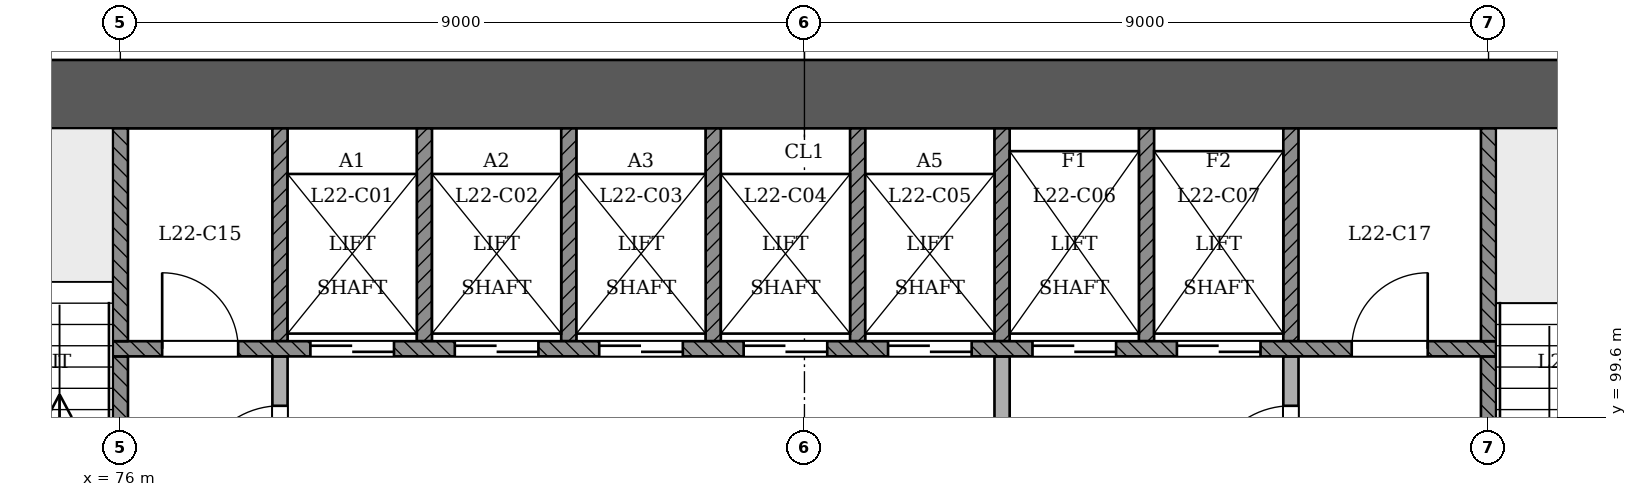
"""IFC4 building model, lengths in metres.
Left out: names, types, materials, properties, quantities, classifications, styles, units other than length and angle.
Written with IfcOpenShell. Run it as: python <this file> out.ifc"""

import sys

from ifc_helpers import new_model, si_unit, direction, frame, frame_2d, origin, place, context, subcontext, project, spatial, rectangle, extrude, element, fill, save


model = new_model("IFC4")
c1 = context("Model", 3, precision=1e-05, world=origin(), true_north=direction((0.0, 1.0)))
c2 = subcontext(c1, "Body", "Model", "MODEL_VIEW")
j1 = project(units=[si_unit("LENGTHUNIT", "METRE"), si_unit("PLANEANGLEUNIT", "RADIAN")], contexts=[c1])
p1 = place(None, origin())
s1 = spatial("IfcSite", under=j1, at=p1, CompositionType="ELEMENT")
p2 = place(p1, origin())
s2 = spatial("IfcBuilding", under=s1, at=p2, CompositionType="ELEMENT")
p3 = place(p2, frame((0.0, 0.0, 88.2)))
s3 = spatial("IfcBuildingStorey", under=s2, at=p3, CompositionType="ELEMENT", Elevation=88.2)
p4 = place(p3, frame((97.45, 103.85, 0.0), z_axis=(0.0, 0.0, 1.0), x_axis=(-1.0, 0.0, 0.0)))
e1 = element("IfcWall", 1, at=p4, inside=s3, PredefinedType="SHEAR", context=c2, shape_type="SweptSolid", body=[
    extrude(rectangle(XDim=25.35, YDim=0.9, at=frame_2d((12.675, 0.0))), origin(), (0.0, 0.0, 1.0), 3.6),
])
p5 = place(p3, frame((87.6, 93.4, 0.0), z_axis=(0.0, 0.0, 1.0), x_axis=(0.0, 1.0, 0.0)))
e2 = element("IfcWall", 2, at=p5, inside=s3, PredefinedType="PARTITIONING", context=c2, shape_type="SweptSolid", body=[
    extrude(rectangle(XDim=7.0, YDim=0.2, at=frame_2d((3.5, 0.0))), origin(), (0.0, 0.0, 1.0), 3.1),
])
p6 = place(p5, frame((4.45, 0.0, 0.0)))
e3 = element("IfcOpeningElement", 3, at=p6, cuts=e2, PredefinedType="OPENING", context=c2, shape_type="SweptSolid", body=[
    extrude(rectangle(XDim=1.1, YDim=2.1, at=frame_2d((0.55, 1.05))), frame((0.0, 0.11, 0.0), z_axis=(0.0, -1.0, 0.0), x_axis=(1.0, 0.0, 0.0)), (0.0, 0.0, 1.0), 0.221),
])
p7 = place(p3, frame((91.4, 96.2, 0.0), z_axis=(0.0, 0.0, 1.0), x_axis=(0.0, 1.0, 0.0)))
e4 = element("IfcWall", 4, at=p7, inside=s3, PredefinedType="PARTITIONING", context=c2, shape_type="SweptSolid", body=[
    extrude(rectangle(XDim=4.2, YDim=0.2, at=frame_2d((2.1, 0.0))), origin(), (0.0, 0.0, 1.0), 3.1),
])
p8 = place(p7, frame((2.45, 0.0, 0.0)))
e5 = element("IfcOpeningElement", 5, at=p8, cuts=e4, PredefinedType="OPENING", context=c2, shape_type="SweptSolid", body=[
    extrude(rectangle(XDim=1.1, YDim=2.1, at=frame_2d((0.55, 1.05))), frame((0.0, 0.11, 0.0), z_axis=(0.0, -1.0, 0.0), x_axis=(1.0, 0.0, 0.0)), (0.0, 0.0, 1.0), 0.221),
])
p9 = place(p3, frame((76.0, 96.7, 0.0), z_axis=(0.0, 0.0, 1.0), x_axis=(0.0, 1.0, 0.0)))
e6 = element("IfcWall", 6, at=p9, inside=s3, PredefinedType="SOLIDWALL", context=c2, shape_type="SweptSolid", body=[
    extrude(rectangle(XDim=3.7, YDim=0.2, at=frame_2d((1.85, 0.0))), origin(), (0.0, 0.0, 1.0), 3.1),
])
p10 = place(p9, frame((0.35, 0.0, 0.0)))
e7 = element("IfcOpeningElement", 7, at=p10, cuts=e6, PredefinedType="OPENING", context=c2, shape_type="SweptSolid", body=[
    extrude(rectangle(XDim=1.1, YDim=2.1, at=frame_2d((0.55, 1.05))), frame((0.0, 0.11, 0.0), z_axis=(0.0, -1.0, 0.0), x_axis=(1.0, 0.0, 0.0)), (0.0, 0.0, 1.0), 0.221),
])
p11 = place(p3, frame((78.1, 96.7, 0.0), z_axis=(0.0, 0.0, 1.0), x_axis=(0.0, 1.0, 0.0)))
e8 = element("IfcWall", 8, at=p11, inside=s3, PredefinedType="PARTITIONING", context=c2, shape_type="SweptSolid", body=[
    extrude(rectangle(XDim=3.7, YDim=0.2, at=frame_2d((1.85, 0.0))), origin(), (0.0, 0.0, 1.0), 3.1),
])
p12 = place(p11, frame((1.95, 0.0, 0.0)))
e9 = element("IfcOpeningElement", 9, at=p12, cuts=e8, PredefinedType="OPENING", context=c2, shape_type="SweptSolid", body=[
    extrude(rectangle(XDim=1.1, YDim=2.1, at=frame_2d((0.55, 1.05))), frame((0.0, 0.11, 0.0), z_axis=(0.0, -1.0, 0.0), x_axis=(1.0, 0.0, 0.0)), (0.0, 0.0, 1.0), 0.221),
])
p13 = place(p3, frame((94.0, 96.7, 0.0), z_axis=(0.0, 0.0, 1.0), x_axis=(0.0, 1.0, 0.0)))
e10 = element("IfcWall", 10, at=p13, inside=s3, PredefinedType="SOLIDWALL", context=c2, shape_type="SweptSolid", body=[
    extrude(rectangle(XDim=3.7, YDim=0.2, at=frame_2d((1.85, 0.0))), origin(), (0.0, 0.0, 1.0), 3.1),
])
p14 = place(p13, frame((0.35, 0.0, 0.0)))
e11 = element("IfcOpeningElement", 11, at=p14, cuts=e10, PredefinedType="OPENING", context=c2, shape_type="SweptSolid", body=[
    extrude(rectangle(XDim=1.1, YDim=2.1, at=frame_2d((0.55, 1.05))), frame((0.0, 0.11, 0.0), z_axis=(0.0, -1.0, 0.0), x_axis=(1.0, 0.0, 0.0)), (0.0, 0.0, 1.0), 0.221),
])
p15 = place(p3, frame((75.9, 100.5, 0.0), z_axis=(0.0, 0.0, 1.0), x_axis=(1.0, 0.0, 0.0)))
e12 = element("IfcWall", 12, at=p15, inside=s3, PredefinedType="SOLIDWALL", context=c2, shape_type="SweptSolid", body=[
    extrude(rectangle(XDim=18.2, YDim=0.2, at=frame_2d((9.1, 0.0))), origin(), (0.0, 0.0, 1.0), 3.1),
])
p16 = place(p15, frame((2.6, 0.0, 0.0)))
e13 = element("IfcOpeningElement", 13, at=p16, cuts=e12, PredefinedType="OPENING", context=c2, shape_type="SweptSolid", body=[
    extrude(rectangle(XDim=1.1, YDim=2.1, at=frame_2d((0.55, 1.05))), frame((0.0, 0.11, 0.0), z_axis=(0.0, -1.0, 0.0), x_axis=(1.0, 0.0, 0.0)), (0.0, 0.0, 1.0), 0.221),
])
p17 = place(p15, frame((4.5, 0.0, 0.0)))
e14 = element("IfcOpeningElement", 14, at=p17, cuts=e12, PredefinedType="OPENING", context=c2, shape_type="SweptSolid", body=[
    extrude(rectangle(XDim=1.1, YDim=2.1, at=frame_2d((0.55, 1.05))), frame((0.0, 0.11, 0.0), z_axis=(0.0, -1.0, 0.0), x_axis=(1.0, 0.0, 0.0)), (0.0, 0.0, 1.0), 0.221),
])
p18 = place(p15, frame((6.4, 0.0, 0.0)))
e15 = element("IfcOpeningElement", 15, at=p18, cuts=e12, PredefinedType="OPENING", context=c2, shape_type="SweptSolid", body=[
    extrude(rectangle(XDim=1.1, YDim=2.1, at=frame_2d((0.55, 1.05))), frame((0.0, 0.11, 0.0), z_axis=(0.0, -1.0, 0.0), x_axis=(1.0, 0.0, 0.0)), (0.0, 0.0, 1.0), 0.221),
])
p19 = place(p15, frame((8.3, 0.0, 0.0)))
e16 = element("IfcOpeningElement", 16, at=p19, cuts=e12, PredefinedType="OPENING", context=c2, shape_type="SweptSolid", body=[
    extrude(rectangle(XDim=1.1, YDim=2.1, at=frame_2d((0.55, 1.05))), frame((0.0, 0.11, 0.0), z_axis=(0.0, -1.0, 0.0), x_axis=(1.0, 0.0, 0.0)), (0.0, 0.0, 1.0), 0.221),
])
p20 = place(p15, frame((10.2, 0.0, 0.0)))
e17 = element("IfcOpeningElement", 17, at=p20, cuts=e12, PredefinedType="OPENING", context=c2, shape_type="SweptSolid", body=[
    extrude(rectangle(XDim=1.1, YDim=2.1, at=frame_2d((0.55, 1.05))), frame((0.0, 0.11, 0.0), z_axis=(0.0, -1.0, 0.0), x_axis=(1.0, 0.0, 0.0)), (0.0, 0.0, 1.0), 0.221),
])
p21 = place(p15, frame((12.1, 0.0, 0.0)))
e18 = element("IfcOpeningElement", 18, at=p21, cuts=e12, PredefinedType="OPENING", context=c2, shape_type="SweptSolid", body=[
    extrude(rectangle(XDim=1.1, YDim=2.1, at=frame_2d((0.55, 1.05))), frame((0.0, 0.11, 0.0), z_axis=(0.0, -1.0, 0.0), x_axis=(1.0, 0.0, 0.0)), (0.0, 0.0, 1.0), 0.221),
])
p22 = place(p15, frame((14.0, 0.0, 0.0)))
e19 = element("IfcOpeningElement", 19, at=p22, cuts=e12, PredefinedType="OPENING", context=c2, shape_type="SweptSolid", body=[
    extrude(rectangle(XDim=1.1, YDim=2.1, at=frame_2d((0.55, 1.05))), frame((0.0, 0.11, 0.0), z_axis=(0.0, -1.0, 0.0), x_axis=(1.0, 0.0, 0.0)), (0.0, 0.0, 1.0), 0.221),
])
p23 = place(p15, frame((0.65, 0.0, 0.0)))
e20 = element("IfcOpeningElement", 20, at=p23, cuts=e12, PredefinedType="OPENING", context=c2, shape_type="SweptSolid", body=[
    extrude(rectangle(XDim=1.0, YDim=2.1, at=frame_2d((0.5, 1.05))), frame((0.0, 0.11, 0.0), z_axis=(0.0, -1.0, 0.0), x_axis=(1.0, 0.0, 0.0)), (0.0, 0.0, 1.0), 0.221),
])
p24 = place(p15, frame((16.3, 0.0, 0.0)))
e21 = element("IfcOpeningElement", 21, at=p24, cuts=e12, PredefinedType="OPENING", context=c2, shape_type="SweptSolid", body=[
    extrude(rectangle(XDim=1.0, YDim=2.1, at=frame_2d((0.5, 1.05))), frame((0.0, 0.11, 0.0), z_axis=(0.0, -1.0, 0.0), x_axis=(1.0, 0.0, 0.0)), (0.0, 0.0, 1.0), 0.221),
])
for number, where, z_axis, x_axis in (
    (22, (76.0, 100.6, 0.0), (0.0, 0.0, 1.0), (0.0, 1.0, 0.0)),
    (23, (78.1, 100.6, 0.0), (0.0, 0.0, 1.0), (0.0, 1.0, 0.0)),
    (24, (80.0, 100.6, 0.0), (0.0, 0.0, 1.0), (0.0, 1.0, 0.0)),
    (25, (81.9, 100.6, 0.0), (0.0, 0.0, 1.0), (0.0, 1.0, 0.0)),
    (26, (83.8, 100.6, 0.0), (0.0, 0.0, 1.0), (0.0, 1.0, 0.0)),
    (27, (85.7, 100.6, 0.0), (0.0, 0.0, 1.0), (0.0, 1.0, 0.0)),
    (28, (87.6, 100.6, 0.0), (0.0, 0.0, 1.0), (0.0, 1.0, 0.0)),
    (29, (89.5, 100.6, 0.0), (0.0, 0.0, 1.0), (0.0, 1.0, 0.0)),
    (30, (91.4, 100.6, 0.0), (0.0, 0.0, 1.0), (0.0, 1.0, 0.0)),
    (31, (94.0, 100.6, 0.0), (0.0, 0.0, 1.0), (0.0, 1.0, 0.0)),
):
    element("IfcWall", number, at=place(p3, frame(where, z_axis=z_axis, x_axis=x_axis)), inside=s3, PredefinedType="SOLIDWALL", context=c2, shape_type="SweptSolid", body=[
        extrude(rectangle(XDim=2.8, YDim=0.2, at=frame_2d((1.4, 0.0))), origin(), (0.0, 0.0, 1.0), 3.1),
    ])
p25 = place(p16, origin())
e32 = element("IfcDoor", 32, at=p25, inside=s3, OperationType="SLIDING_TO_RIGHT", PredefinedType="NOTDEFINED", context=c2, shape_type="SweptSolid", body=[
    extrude(rectangle(XDim=1.1, YDim=2.1, at=frame_2d((0.55, 1.05))), frame((0.0, 0.025, 0.0), z_axis=(0.0, -1.0, 0.0), x_axis=(1.0, 0.0, 0.0)), (0.0, 0.0, 1.0), 0.05),
])
fill(e13, e32)
p26 = place(p17, origin())
e33 = element("IfcDoor", 33, at=p26, inside=s3, OperationType="SLIDING_TO_LEFT", PredefinedType="NOTDEFINED", context=c2, shape_type="SweptSolid", body=[
    extrude(rectangle(XDim=1.1, YDim=2.1, at=frame_2d((0.55, 1.05))), frame((0.0, 0.025, 0.0), z_axis=(0.0, -1.0, 0.0), x_axis=(1.0, 0.0, 0.0)), (0.0, 0.0, 1.0), 0.05),
])
fill(e14, e33)
p27 = place(p18, origin())
e34 = element("IfcDoor", 34, at=p27, inside=s3, OperationType="SLIDING_TO_RIGHT", PredefinedType="NOTDEFINED", context=c2, shape_type="SweptSolid", body=[
    extrude(rectangle(XDim=1.1, YDim=2.1, at=frame_2d((0.55, 1.05))), frame((0.0, 0.025, 0.0), z_axis=(0.0, -1.0, 0.0), x_axis=(1.0, 0.0, 0.0)), (0.0, 0.0, 1.0), 0.05),
])
fill(e15, e34)
p28 = place(p19, origin())
e35 = element("IfcDoor", 35, at=p28, inside=s3, OperationType="SLIDING_TO_LEFT", PredefinedType="NOTDEFINED", context=c2, shape_type="SweptSolid", body=[
    extrude(rectangle(XDim=1.1, YDim=2.1, at=frame_2d((0.55, 1.05))), frame((0.0, 0.025, 0.0), z_axis=(0.0, -1.0, 0.0), x_axis=(1.0, 0.0, 0.0)), (0.0, 0.0, 1.0), 0.05),
])
fill(e16, e35)
p29 = place(p20, origin())
e36 = element("IfcDoor", 36, at=p29, inside=s3, OperationType="SLIDING_TO_RIGHT", PredefinedType="NOTDEFINED", context=c2, shape_type="SweptSolid", body=[
    extrude(rectangle(XDim=1.1, YDim=2.1, at=frame_2d((0.55, 1.05))), frame((0.0, 0.025, 0.0), z_axis=(0.0, -1.0, 0.0), x_axis=(1.0, 0.0, 0.0)), (0.0, 0.0, 1.0), 0.05),
])
fill(e17, e36)
p30 = place(p21, origin())
e37 = element("IfcDoor", 37, at=p30, inside=s3, OperationType="SLIDING_TO_RIGHT", PredefinedType="NOTDEFINED", context=c2, shape_type="SweptSolid", body=[
    extrude(rectangle(XDim=1.1, YDim=2.1, at=frame_2d((0.55, 1.05))), frame((0.0, 0.025, 0.0), z_axis=(0.0, -1.0, 0.0), x_axis=(1.0, 0.0, 0.0)), (0.0, 0.0, 1.0), 0.05),
])
fill(e18, e37)
p31 = place(p22, origin())
e38 = element("IfcDoor", 38, at=p31, inside=s3, OperationType="SLIDING_TO_LEFT", PredefinedType="NOTDEFINED", context=c2, shape_type="SweptSolid", body=[
    extrude(rectangle(XDim=1.1, YDim=2.1, at=frame_2d((0.55, 1.05))), frame((0.0, 0.025, 0.0), z_axis=(0.0, -1.0, 0.0), x_axis=(1.0, 0.0, 0.0)), (0.0, 0.0, 1.0), 0.05),
])
fill(e19, e38)
p32 = place(p12, origin())
e39 = element("IfcDoor", 39, at=p32, inside=s3, OperationType="SINGLE_SWING_LEFT", PredefinedType="NOTDEFINED", context=c2, shape_type="SweptSolid", body=[
    extrude(rectangle(XDim=1.1, YDim=2.1, at=frame_2d((0.55, 1.05))), frame((0.0, 0.025, 0.0), z_axis=(0.0, -1.0, 0.0), x_axis=(1.0, 0.0, 0.0)), (0.0, 0.0, 1.0), 0.05),
])
fill(e9, e39)
p33 = place(p8, origin())
e40 = element("IfcDoor", 40, at=p33, inside=s3, OperationType="SINGLE_SWING_LEFT", PredefinedType="NOTDEFINED", context=c2, shape_type="SweptSolid", body=[
    extrude(rectangle(XDim=1.1, YDim=2.1, at=frame_2d((0.55, 1.05))), frame((0.0, 0.025, 0.0), z_axis=(0.0, -1.0, 0.0), x_axis=(1.0, 0.0, 0.0)), (0.0, 0.0, 1.0), 0.05),
])
fill(e5, e40)
p34 = place(p23, origin())
e41 = element("IfcDoor", 41, at=p34, inside=s3, OperationType="SINGLE_SWING_LEFT", PredefinedType="NOTDEFINED", context=c2, shape_type="SweptSolid", body=[
    extrude(rectangle(XDim=1.0, YDim=2.1, at=frame_2d((0.5, 1.05))), frame((0.0, 0.025, 0.0), z_axis=(0.0, -1.0, 0.0), x_axis=(1.0, 0.0, 0.0)), (0.0, 0.0, 1.0), 0.05),
])
fill(e20, e41)
p35 = place(p24, origin())
e42 = element("IfcDoor", 42, at=p35, inside=s3, OperationType="SINGLE_SWING_RIGHT", PredefinedType="NOTDEFINED", context=c2, shape_type="SweptSolid", body=[
    extrude(rectangle(XDim=1.0, YDim=2.1, at=frame_2d((0.5, 1.05))), frame((0.0, 0.025, 0.0), z_axis=(0.0, -1.0, 0.0), x_axis=(1.0, 0.0, 0.0)), (0.0, 0.0, 1.0), 0.05),
])
fill(e21, e42)
save(model, sys.argv[1])
